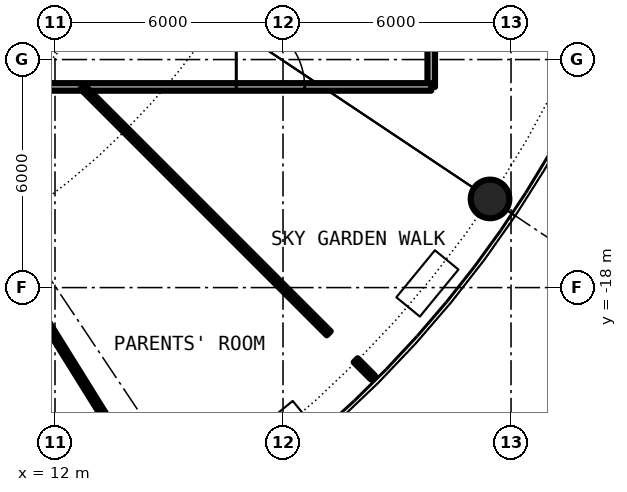
"""IFC4 building model, lengths in metres.
Left out: names, types, materials, properties, quantities, classifications, styles, units other than length and angle.
Written with IfcOpenShell. Run it as: python <this file> out.ifc"""

import sys

from ifc_helpers import new_model, si_unit, direction, frame, frame_2d, origin, origin_2d, place, context, subcontext, project, spatial, rectangle, hollow_circle, extrude, element, fill, save


model = new_model("IFC4")
c1 = context("Model", 3, precision=1e-05, world=origin(), true_north=direction((0.0, 1.0)))
c2 = subcontext(c1, "Body", "Model", "MODEL_VIEW")
j1 = project(units=[si_unit("LENGTHUNIT", "METRE"), si_unit("PLANEANGLEUNIT", "RADIAN")], contexts=[c1])
p1 = place(None, origin())
s1 = spatial("IfcSite", under=j1, at=p1, CompositionType="ELEMENT")
p2 = place(p1, origin())
s2 = spatial("IfcBuilding", under=s1, at=p2, CompositionType="ELEMENT")
p3 = place(p2, frame((0.0, 0.0, 97.15)))
s3 = spatial("IfcBuildingStorey", under=s2, at=p3, CompositionType="ELEMENT", Elevation=97.15)
p4 = place(p3, frame((23.448, -15.667, 0.0), z_axis=(0.0, 0.0, 1.0), x_axis=(1.0, 0.0, 0.0)))
e1 = element("IfcColumn", 1, at=p4, inside=s3, PredefinedType="COLUMN", context=c2, shape_type="SweptSolid", body=[
    extrude(hollow_circle(Radius=0.508, WallThickness=0.04, at=origin_2d()), origin(), (0.0, 0.0, 1.0), 6.1),
])
p5 = place(p3, frame((21.9, -12.72, 0.0), z_axis=(0.0, 0.0, 1.0), x_axis=(0.0, 1.0, 0.0)))
e2 = element("IfcWall", 2, at=p5, inside=s3, PredefinedType="PARTITIONING", context=c2, shape_type="SweptSolid", body=[
    extrude(rectangle(XDim=3.4, YDim=0.2, at=frame_2d((1.7, 0.0))), origin(), (0.0, 0.0, 1.0), 5.7),
])
p6 = place(p3, frame((6.0, -12.72, 0.0), z_axis=(0.0, 0.0, 1.0), x_axis=(1.0, 0.0, 0.0)))
e3 = element("IfcWall", 3, at=p6, inside=s3, PredefinedType="PARTITIONING", context=c2, shape_type="SweptSolid", body=[
    extrude(rectangle(XDim=15.9, YDim=0.2, at=frame_2d((7.95, 0.0))), origin(), (0.0, 0.0, 1.0), 5.7),
])
p7 = place(p6, frame((3.816, 0.0, 0.0)))
e4 = element("IfcOpeningElement", 4, at=p7, cuts=e3, PredefinedType="OPENING", context=c2, shape_type="SweptSolid", body=[
    extrude(rectangle(XDim=1.0, YDim=2.3, at=frame_2d((0.5, 1.15))), frame((0.0, 0.11, 0.0), z_axis=(0.0, -1.0, 0.0), x_axis=(1.0, 0.0, 0.0)), (0.0, 0.0, 1.0), 0.22),
])
p8 = place(p6, frame((10.77, 0.0, 0.0)))
e5 = element("IfcOpeningElement", 5, at=p8, cuts=e3, PredefinedType="OPENING", context=c2, shape_type="SweptSolid", body=[
    extrude(rectangle(XDim=1.8, YDim=2.3, at=frame_2d((0.9, 1.15))), frame((0.0, 0.11, 0.0), z_axis=(0.0, -1.0, 0.0), x_axis=(1.0, 0.0, 0.0)), (0.0, 0.0, 1.0), 0.22),
])
p9 = place(p3, frame((7.912, -12.72, 0.0), z_axis=(0.0, 0.0, 1.0), x_axis=(0.528173452455, -0.849136504999, 0.0)))
e6 = element("IfcWall", 6, at=p9, inside=s3, PredefinedType="PARTITIONING", context=c2, shape_type="SweptSolid", body=[
    extrude(rectangle(XDim=12.547, YDim=0.15, at=frame_2d((6.273, 0.0))), origin(), (0.0, 0.0, 1.0), 5.7),
])
p10 = place(p3, frame((12.72, -12.72, 0.0), z_axis=(0.0, 0.0, 1.0), x_axis=(0.707106781187, -0.707106781187, 0.0)))
e7 = element("IfcWall", 7, at=p10, inside=s3, PredefinedType="PARTITIONING", context=c2, shape_type="SweptSolid", body=[
    extrude(rectangle(XDim=9.17, YDim=0.15, at=frame_2d((4.585, 0.0))), origin(), (0.0, 0.0, 1.0), 5.7),
])
p11 = place(p3, frame((19.911, -19.911, 0.0), z_axis=(0.0, 0.0, 1.0), x_axis=(0.707106781187, -0.707106781187, 0.0)))
e8 = element("IfcWall", 8, at=p11, inside=s3, PredefinedType="PARTITIONING", context=c2, shape_type="SweptSolid", body=[
    extrude(rectangle(XDim=0.642, YDim=0.15, at=frame_2d((0.321, 0.0))), origin(), (0.0, 0.0, 1.0), 5.7),
])
p12 = place(p8, origin())
e9 = element("IfcDoor", 9, at=p12, inside=s3, OperationType="DOUBLE_DOOR_SINGLE_SWING", PredefinedType="DOOR", context=c2, shape_type="SweptSolid", body=[
    extrude(rectangle(XDim=1.8, YDim=2.3, at=frame_2d((0.9, 1.15))), frame((0.0, 0.025, 0.0), z_axis=(0.0, -1.0, 0.0), x_axis=(1.0, 0.0, 0.0)), (0.0, 0.0, 1.0), 0.05),
])
fill(e5, e9)
save(model, sys.argv[1])
